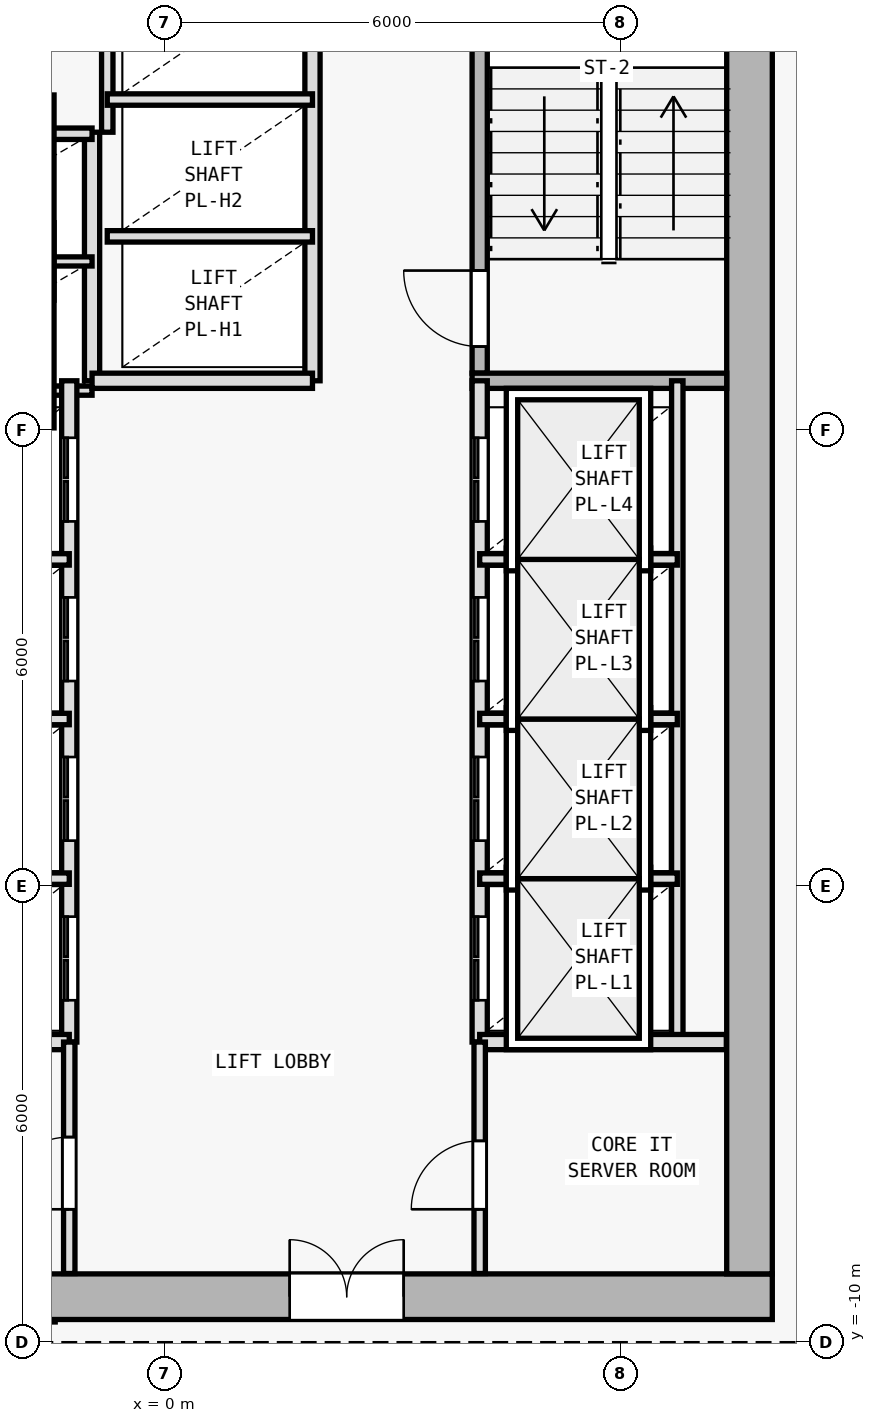
"""IFC4 building model, lengths in metres.
Left out: names, types, materials, properties, quantities, classifications, styles, units other than length and angle.
Written with IfcOpenShell. Run it as: python <this file> out.ifc"""

import sys

from ifc_helpers import new_model, si_unit, direction, frame, frame_2d, origin, origin_2d, place, context, subcontext, project, spatial, rectangle, i_section, extrude, element, fill, save


model = new_model("IFC4")
c1 = context("Model", 3, precision=1e-05, world=origin(), true_north=direction((0.0, 1.0)))
c2 = subcontext(c1, "Body", "Model", "MODEL_VIEW")
j1 = project(units=[si_unit("LENGTHUNIT", "METRE"), si_unit("PLANEANGLEUNIT", "RADIAN")], contexts=[c1])
p1 = place(None, origin())
s1 = spatial("IfcSite", under=j1, at=p1, CompositionType="ELEMENT")
p2 = place(p1, origin())
s2 = spatial("IfcBuilding", under=s1, at=p2, CompositionType="ELEMENT")
p3 = place(p2, frame((0.0, 0.0, 104.1)))
s3 = spatial("IfcBuildingStorey", under=s2, at=p3, CompositionType="ELEMENT", Elevation=104.1)
for number, where, z_axis, x_axis in (
    (1, (7.7, -9.4, 0.0), (0.0, 0.0, 1.0), (1.0, 0.0, 0.0)),
    (2, (0.0, -9.4, 0.0), (0.0, 0.0, 1.0), (1.0, 0.0, 0.0)),
    (3, (7.7, 0.4, 0.0), (0.0, 0.0, 1.0), (1.0, 0.0, 0.0)),
):
    element("IfcColumn", number, at=place(p3, frame(where, z_axis=z_axis, x_axis=x_axis)), inside=s3, PredefinedType="COLUMN", context=c2, shape_type="SweptSolid", body=[
        extrude(i_section(OverallWidth=0.409, OverallDepth=0.425, WebThickness=0.021, FlangeThickness=0.034, FilletRadius=0.015, at=origin_2d()), origin(), (0.0, 0.0, 1.0), 3.6),
    ])
p4 = place(p3, frame((-8.0, -9.4, 0.0), z_axis=(0.0, 0.0, 1.0), x_axis=(1.0, 0.0, 0.0)))
e4 = element("IfcWall", 4, at=p4, inside=s3, PredefinedType="SHEAR", context=c2, shape_type="SweptSolid", body=[
    extrude(rectangle(XDim=16.0, YDim=0.6, at=frame_2d((8.0, 0.0))), origin(), (0.0, 0.0, 1.0), 3.35),
])
p5 = place(p4, frame((9.65, 0.0, 0.0)))
e5 = element("IfcOpeningElement", 5, at=p5, cuts=e4, PredefinedType="OPENING", context=c2, shape_type="SweptSolid", body=[
    extrude(rectangle(XDim=1.5, YDim=2.2, at=frame_2d((0.75, 1.1))), frame((0.0, 0.31, 0.0), z_axis=(0.0, -1.0, 0.0), x_axis=(1.0, 0.0, 0.0)), (0.0, 0.0, 1.0), 0.62),
])
p6 = place(p3, frame((7.7, 9.9, 0.0), z_axis=(0.0, 0.0, 1.0), x_axis=(0.0, -1.0, 0.0)))
e6 = element("IfcWall", 6, at=p6, inside=s3, PredefinedType="SHEAR", context=c2, shape_type="SweptSolid", body=[
    extrude(rectangle(XDim=19.0, YDim=0.6, at=frame_2d((9.5, 0.0))), origin(), (0.0, 0.0, 1.0), 3.35),
])
p7 = place(p3, frame((4.15, 2.75, 0.0), z_axis=(0.0, 0.0, 1.0), x_axis=(0.0, 1.0, 0.0)))
e7 = element("IfcWall", 7, at=p7, inside=s3, PredefinedType="SOLIDWALL", context=c2, shape_type="SweptSolid", body=[
    extrude(rectangle(XDim=7.15, YDim=0.2, at=frame_2d((3.575, 0.0))), origin(), (0.0, 0.0, 1.0), 3.35),
])
p8 = place(p7, frame((0.35, 0.0, 0.0)))
e8 = element("IfcOpeningElement", 8, at=p8, cuts=e7, PredefinedType="OPENING", context=c2, shape_type="SweptSolid", body=[
    extrude(rectangle(XDim=1.0, YDim=2.15, at=frame_2d((0.5, 1.075))), frame((0.0, 0.11, 0.0), z_axis=(0.0, -1.0, 0.0), x_axis=(1.0, 0.0, 0.0)), (0.0, 0.0, 1.0), 0.22),
])
p9 = place(p3, frame((4.05, 2.65, 0.0), z_axis=(0.0, 0.0, 1.0), x_axis=(1.0, 0.0, 0.0)))
e9 = element("IfcWall", 9, at=p9, inside=s3, PredefinedType="SOLIDWALL", context=c2, shape_type="SweptSolid", body=[
    extrude(rectangle(XDim=3.35, YDim=0.2, at=frame_2d((1.675, 0.0))), origin(), (0.0, 0.0, 1.0), 3.35),
])
p10 = place(p3, frame((-0.95, 2.65, 0.0), z_axis=(0.0, 0.0, 1.0), x_axis=(0.0, 1.0, 0.0)))
e10 = element("IfcWall", 10, at=p10, inside=s3, PredefinedType="SOLIDWALL", context=c2, shape_type="SweptSolid", body=[
    extrude(rectangle(XDim=3.27, YDim=0.2, at=frame_2d((1.635, 0.0))), origin(), (0.0, 0.0, 1.0), 3.35),
])
for number, where, z_axis, x_axis in (
    (11, (-3.85, 2.52, 0.0), (0.0, 0.0, 1.0), (1.0, 0.0, 0.0)),
    (12, (-3.85, 4.22, 0.0), (0.0, 0.0, 1.0), (1.0, 0.0, 0.0)),
):
    element("IfcWall", number, at=place(p3, frame(where, z_axis=z_axis, x_axis=x_axis)), inside=s3, PredefinedType="PARTITIONING", context=c2, shape_type="SweptSolid", body=[
        extrude(rectangle(XDim=2.9, YDim=0.12, at=frame_2d((1.45, 0.0))), origin(), (0.0, 0.0, 1.0), 3.35),
    ])
p11 = place(p3, frame((-3.85, 5.9, 0.0), z_axis=(0.0, 0.0, 1.0), x_axis=(1.0, 0.0, 0.0)))
e13 = element("IfcWall", 13, at=p11, inside=s3, PredefinedType="PARTITIONING", context=c2, shape_type="SweptSolid", body=[
    extrude(rectangle(XDim=2.9, YDim=0.15, at=frame_2d((1.45, 0.0))), origin(), (0.0, 0.0, 1.0), 3.35),
])
p12 = place(p3, frame((4.15, -6.05, 0.0), z_axis=(0.0, 0.0, 1.0), x_axis=(0.0, 1.0, 0.0)))
e14 = element("IfcWall", 14, at=p12, inside=s3, PredefinedType="SOLIDWALL", context=c2, shape_type="SweptSolid", body=[
    extrude(rectangle(XDim=8.7, YDim=0.2, at=frame_2d((4.35, 0.0))), origin(), (0.0, 0.0, 1.0), 3.35),
])
p13 = place(p12, frame((0.55, 0.0, 0.0)))
e15 = element("IfcOpeningElement", 15, at=p13, cuts=e14, PredefinedType="OPENING", context=c2, shape_type="SweptSolid", body=[
    extrude(rectangle(XDim=1.1, YDim=2.15, at=frame_2d((0.55, 1.075))), frame((0.0, 0.11, 0.0), z_axis=(0.0, -1.0, 0.0), x_axis=(1.0, 0.0, 0.0)), (0.0, 0.0, 1.0), 0.22),
])
p14 = place(p12, frame((2.65, 0.0, 0.0)))
e16 = element("IfcOpeningElement", 16, at=p14, cuts=e14, PredefinedType="OPENING", context=c2, shape_type="SweptSolid", body=[
    extrude(rectangle(XDim=1.1, YDim=2.15, at=frame_2d((0.55, 1.075))), frame((0.0, 0.11, 0.0), z_axis=(0.0, -1.0, 0.0), x_axis=(1.0, 0.0, 0.0)), (0.0, 0.0, 1.0), 0.22),
])
p15 = place(p12, frame((4.75, 0.0, 0.0)))
e17 = element("IfcOpeningElement", 17, at=p15, cuts=e14, PredefinedType="OPENING", context=c2, shape_type="SweptSolid", body=[
    extrude(rectangle(XDim=1.1, YDim=2.15, at=frame_2d((0.55, 1.075))), frame((0.0, 0.11, 0.0), z_axis=(0.0, -1.0, 0.0), x_axis=(1.0, 0.0, 0.0)), (0.0, 0.0, 1.0), 0.22),
])
p16 = place(p12, frame((6.85, 0.0, 0.0)))
e18 = element("IfcOpeningElement", 18, at=p16, cuts=e14, PredefinedType="OPENING", context=c2, shape_type="SweptSolid", body=[
    extrude(rectangle(XDim=1.1, YDim=2.15, at=frame_2d((0.55, 1.075))), frame((0.0, 0.11, 0.0), z_axis=(0.0, -1.0, 0.0), x_axis=(1.0, 0.0, 0.0)), (0.0, 0.0, 1.0), 0.22),
])
p17 = place(p3, frame((6.75, -6.05, 0.0), z_axis=(0.0, 0.0, 1.0), x_axis=(0.0, 1.0, 0.0)))
e19 = element("IfcWall", 19, at=p17, inside=s3, PredefinedType="PARTITIONING", context=c2, shape_type="SweptSolid", body=[
    extrude(rectangle(XDim=8.7, YDim=0.15, at=frame_2d((4.35, 0.0))), origin(), (0.0, 0.0, 1.0), 3.35),
])
for number, where, z_axis, x_axis in (
    (20, (4.15, -3.9, 0.0), (0.0, 0.0, 1.0), (1.0, 0.0, 0.0)),
    (21, (4.15, -1.8, 0.0), (0.0, 0.0, 1.0), (1.0, 0.0, 0.0)),
    (22, (4.15, 0.3, 0.0), (0.0, 0.0, 1.0), (1.0, 0.0, 0.0)),
):
    element("IfcWall", number, at=place(p3, frame(where, z_axis=z_axis, x_axis=x_axis)), inside=s3, PredefinedType="PARTITIONING", context=c2, shape_type="SweptSolid", body=[
        extrude(rectangle(XDim=2.6, YDim=0.15, at=frame_2d((1.3, 0.0))), origin(), (0.0, 0.0, 1.0), 3.35),
    ])
p18 = place(p3, frame((-1.25, -6.05, 0.0), z_axis=(0.0, 0.0, 1.0), x_axis=(0.0, 1.0, 0.0)))
e23 = element("IfcWall", 23, at=p18, inside=s3, PredefinedType="SOLIDWALL", context=c2, shape_type="SweptSolid", body=[
    extrude(rectangle(XDim=8.7, YDim=0.2, at=frame_2d((4.35, 0.0))), origin(), (0.0, 0.0, 1.0), 3.35),
])
p19 = place(p18, frame((0.55, 0.0, 0.0)))
e24 = element("IfcOpeningElement", 24, at=p19, cuts=e23, PredefinedType="OPENING", context=c2, shape_type="SweptSolid", body=[
    extrude(rectangle(XDim=1.1, YDim=2.15, at=frame_2d((0.55, 1.075))), frame((0.0, 0.11, 0.0), z_axis=(0.0, -1.0, 0.0), x_axis=(1.0, 0.0, 0.0)), (0.0, 0.0, 1.0), 0.22),
])
p20 = place(p18, frame((2.65, 0.0, 0.0)))
e25 = element("IfcOpeningElement", 25, at=p20, cuts=e23, PredefinedType="OPENING", context=c2, shape_type="SweptSolid", body=[
    extrude(rectangle(XDim=1.1, YDim=2.15, at=frame_2d((0.55, 1.075))), frame((0.0, 0.11, 0.0), z_axis=(0.0, -1.0, 0.0), x_axis=(1.0, 0.0, 0.0)), (0.0, 0.0, 1.0), 0.22),
])
p21 = place(p18, frame((4.75, 0.0, 0.0)))
e26 = element("IfcOpeningElement", 26, at=p21, cuts=e23, PredefinedType="OPENING", context=c2, shape_type="SweptSolid", body=[
    extrude(rectangle(XDim=1.1, YDim=2.15, at=frame_2d((0.55, 1.075))), frame((0.0, 0.11, 0.0), z_axis=(0.0, -1.0, 0.0), x_axis=(1.0, 0.0, 0.0)), (0.0, 0.0, 1.0), 0.22),
])
p22 = place(p18, frame((6.85, 0.0, 0.0)))
e27 = element("IfcOpeningElement", 27, at=p22, cuts=e23, PredefinedType="OPENING", context=c2, shape_type="SweptSolid", body=[
    extrude(rectangle(XDim=1.1, YDim=2.15, at=frame_2d((0.55, 1.075))), frame((0.0, 0.11, 0.0), z_axis=(0.0, -1.0, 0.0), x_axis=(1.0, 0.0, 0.0)), (0.0, 0.0, 1.0), 0.22),
])
for number, where, z_axis, x_axis in (
    (28, (-4.15, -3.9, 0.0), (0.0, 0.0, 1.0), (1.0, 0.0, 0.0)),
    (29, (-4.15, -1.8, 0.0), (0.0, 0.0, 1.0), (1.0, 0.0, 0.0)),
    (30, (-4.15, 0.3, 0.0), (0.0, 0.0, 1.0), (1.0, 0.0, 0.0)),
):
    element("IfcWall", number, at=place(p3, frame(where, z_axis=z_axis, x_axis=x_axis)), inside=s3, PredefinedType="PARTITIONING", context=c2, shape_type="SweptSolid", body=[
        extrude(rectangle(XDim=2.9, YDim=0.15, at=frame_2d((1.45, 0.0))), origin(), (0.0, 0.0, 1.0), 3.35),
    ])
p23 = place(p3, frame((1.95, 2.65, 0.0), z_axis=(0.0, 0.0, 1.0), x_axis=(0.0, 1.0, 0.0)))
e31 = element("IfcWall", 31, at=p23, inside=s3, PredefinedType="SOLIDWALL", context=c2, shape_type="SweptSolid", body=[
    extrude(rectangle(XDim=7.245, YDim=0.2, at=frame_2d((3.623, 0.0))), origin(), (0.0, 0.0, 1.0), 3.35),
])
p24 = place(p3, frame((-0.95, 2.65, 0.0), z_axis=(0.0, 0.0, 1.0), x_axis=(1.0, 0.0, 0.0)))
e32 = element("IfcWall", 32, at=p24, inside=s3, PredefinedType="SOLIDWALL", context=c2, shape_type="SweptSolid", body=[
    extrude(rectangle(XDim=2.9, YDim=0.2, at=frame_2d((1.45, 0.0))), origin(), (0.0, 0.0, 1.0), 3.35),
])
p25 = place(p3, frame((-0.75, 5.92, 0.0), z_axis=(0.0, 0.0, 1.0), x_axis=(0.0, 1.0, 0.0)))
e33 = element("IfcWall", 33, at=p25, inside=s3, PredefinedType="PARTITIONING", context=c2, shape_type="SweptSolid", body=[
    extrude(rectangle(XDim=3.975, YDim=0.15, at=frame_2d((1.988, 0.0))), origin(), (0.0, 0.0, 1.0), 3.35),
])
for number, where, z_axis, x_axis in (
    (34, (-0.75, 4.55, 0.0), (0.0, 0.0, 1.0), (1.0, 0.0, 0.0)),
    (35, (-0.75, 6.35, 0.0), (0.0, 0.0, 1.0), (1.0, 0.0, 0.0)),
):
    element("IfcWall", number, at=place(p3, frame(where, z_axis=z_axis, x_axis=x_axis)), inside=s3, PredefinedType="PARTITIONING", context=c2, shape_type="SweptSolid", body=[
        extrude(rectangle(XDim=2.7, YDim=0.15, at=frame_2d((1.35, 0.0))), origin(), (0.0, 0.0, 1.0), 3.35),
    ])
p26 = place(p3, frame((-4.04, -6.05, 0.0), z_axis=(0.0, 0.0, 1.0), x_axis=(1.0, 0.0, 0.0)))
e36 = element("IfcWall", 36, at=p26, inside=s3, PredefinedType="SOLIDWALL", context=c2, shape_type="SweptSolid", body=[
    extrude(rectangle(XDim=2.79, YDim=0.2, at=frame_2d((1.395, 0.0))), origin(), (0.0, 0.0, 1.0), 3.35),
])
p27 = place(p3, frame((4.15, -6.05, 0.0), z_axis=(0.0, 0.0, 1.0), x_axis=(1.0, 0.0, 0.0)))
e37 = element("IfcWall", 37, at=p27, inside=s3, PredefinedType="SOLIDWALL", context=c2, shape_type="SweptSolid", body=[
    extrude(rectangle(XDim=3.245, YDim=0.2, at=frame_2d((1.623, 0.0))), origin(), (0.0, 0.0, 1.0), 3.35),
])
p28 = place(p3, frame((-1.25, -9.095, 0.0), z_axis=(0.0, 0.0, 1.0), x_axis=(0.0, 1.0, 0.0)))
e38 = element("IfcWall", 38, at=p28, inside=s3, PredefinedType="PARTITIONING", context=c2, shape_type="SweptSolid", body=[
    extrude(rectangle(XDim=3.045, YDim=0.15, at=frame_2d((1.522, 0.0))), origin(), (0.0, 0.0, 1.0), 3.35),
])
p29 = place(p28, frame((0.845, 0.0, 0.0)))
e39 = element("IfcOpeningElement", 39, at=p29, cuts=e38, PredefinedType="OPENING", context=c2, shape_type="SweptSolid", body=[
    extrude(rectangle(XDim=0.95, YDim=2.1, at=frame_2d((0.475, 1.05))), frame((0.0, 0.085, 0.0), z_axis=(0.0, -1.0, 0.0), x_axis=(1.0, 0.0, 0.0)), (0.0, 0.0, 1.0), 0.17),
])
p30 = place(p3, frame((4.15, -9.095, 0.0), z_axis=(0.0, 0.0, 1.0), x_axis=(0.0, 1.0, 0.0)))
e40 = element("IfcWall", 40, at=p30, inside=s3, PredefinedType="PARTITIONING", context=c2, shape_type="SweptSolid", body=[
    extrude(rectangle(XDim=3.045, YDim=0.15, at=frame_2d((1.522, 0.0))), origin(), (0.0, 0.0, 1.0), 3.35),
])
p31 = place(p30, frame((0.845, 0.0, 0.0)))
e41 = element("IfcOpeningElement", 41, at=p31, cuts=e40, PredefinedType="OPENING", context=c2, shape_type="SweptSolid", body=[
    extrude(rectangle(XDim=0.9, YDim=2.1, at=frame_2d((0.45, 1.05))), frame((0.0, 0.085, 0.0), z_axis=(0.0, -1.0, 0.0), x_axis=(1.0, 0.0, 0.0)), (0.0, 0.0, 1.0), 0.17),
])
p32 = place(p5, origin())
e42 = element("IfcDoor", 42, at=p32, inside=s3, OperationType="DOUBLE_DOOR_SINGLE_SWING", PredefinedType="DOOR", context=c2, shape_type="SweptSolid", body=[
    extrude(rectangle(XDim=1.5, YDim=2.2, at=frame_2d((0.75, 1.1))), frame((0.0, 0.025, 0.0), z_axis=(0.0, -1.0, 0.0), x_axis=(1.0, 0.0, 0.0)), (0.0, 0.0, 1.0), 0.05),
])
fill(e5, e42)
p33 = place(p8, origin())
e43 = element("IfcDoor", 43, at=p33, inside=s3, OperationType="SINGLE_SWING_RIGHT", PredefinedType="DOOR", context=c2, shape_type="SweptSolid", body=[
    extrude(rectangle(XDim=1.0, YDim=2.15, at=frame_2d((0.5, 1.075))), frame((0.0, 0.025, 0.0), z_axis=(0.0, -1.0, 0.0), x_axis=(1.0, 0.0, 0.0)), (0.0, 0.0, 1.0), 0.05),
])
fill(e8, e43)
p34 = place(p13, origin())
e44 = element("IfcDoor", 44, at=p34, inside=s3, OperationType="DOUBLE_DOOR_SLIDING", PredefinedType="DOOR", context=c2, shape_type="SweptSolid", body=[
    extrude(rectangle(XDim=1.1, YDim=2.15, at=frame_2d((0.55, 1.075))), frame((0.0, 0.025, 0.0), z_axis=(0.0, -1.0, 0.0), x_axis=(1.0, 0.0, 0.0)), (0.0, 0.0, 1.0), 0.05),
])
fill(e15, e44)
p35 = place(p14, origin())
e45 = element("IfcDoor", 45, at=p35, inside=s3, OperationType="DOUBLE_DOOR_SLIDING", PredefinedType="DOOR", context=c2, shape_type="SweptSolid", body=[
    extrude(rectangle(XDim=1.1, YDim=2.15, at=frame_2d((0.55, 1.075))), frame((0.0, 0.025, 0.0), z_axis=(0.0, -1.0, 0.0), x_axis=(1.0, 0.0, 0.0)), (0.0, 0.0, 1.0), 0.05),
])
fill(e16, e45)
p36 = place(p15, origin())
e46 = element("IfcDoor", 46, at=p36, inside=s3, OperationType="DOUBLE_DOOR_SLIDING", PredefinedType="DOOR", context=c2, shape_type="SweptSolid", body=[
    extrude(rectangle(XDim=1.1, YDim=2.15, at=frame_2d((0.55, 1.075))), frame((0.0, 0.025, 0.0), z_axis=(0.0, -1.0, 0.0), x_axis=(1.0, 0.0, 0.0)), (0.0, 0.0, 1.0), 0.05),
])
fill(e17, e46)
p37 = place(p16, origin())
e47 = element("IfcDoor", 47, at=p37, inside=s3, OperationType="DOUBLE_DOOR_SLIDING", PredefinedType="DOOR", context=c2, shape_type="SweptSolid", body=[
    extrude(rectangle(XDim=1.1, YDim=2.15, at=frame_2d((0.55, 1.075))), frame((0.0, 0.025, 0.0), z_axis=(0.0, -1.0, 0.0), x_axis=(1.0, 0.0, 0.0)), (0.0, 0.0, 1.0), 0.05),
])
fill(e18, e47)
p38 = place(p19, origin())
e48 = element("IfcDoor", 48, at=p38, inside=s3, OperationType="DOUBLE_DOOR_SLIDING", PredefinedType="DOOR", context=c2, shape_type="SweptSolid", body=[
    extrude(rectangle(XDim=1.1, YDim=2.15, at=frame_2d((0.55, 1.075))), frame((0.0, 0.025, 0.0), z_axis=(0.0, -1.0, 0.0), x_axis=(1.0, 0.0, 0.0)), (0.0, 0.0, 1.0), 0.05),
])
fill(e24, e48)
p39 = place(p20, origin())
e49 = element("IfcDoor", 49, at=p39, inside=s3, OperationType="DOUBLE_DOOR_SLIDING", PredefinedType="DOOR", context=c2, shape_type="SweptSolid", body=[
    extrude(rectangle(XDim=1.1, YDim=2.15, at=frame_2d((0.55, 1.075))), frame((0.0, 0.025, 0.0), z_axis=(0.0, -1.0, 0.0), x_axis=(1.0, 0.0, 0.0)), (0.0, 0.0, 1.0), 0.05),
])
fill(e25, e49)
p40 = place(p21, origin())
e50 = element("IfcDoor", 50, at=p40, inside=s3, OperationType="DOUBLE_DOOR_SLIDING", PredefinedType="DOOR", context=c2, shape_type="SweptSolid", body=[
    extrude(rectangle(XDim=1.1, YDim=2.15, at=frame_2d((0.55, 1.075))), frame((0.0, 0.025, 0.0), z_axis=(0.0, -1.0, 0.0), x_axis=(1.0, 0.0, 0.0)), (0.0, 0.0, 1.0), 0.05),
])
fill(e26, e50)
p41 = place(p22, origin())
e51 = element("IfcDoor", 51, at=p41, inside=s3, OperationType="DOUBLE_DOOR_SLIDING", PredefinedType="DOOR", context=c2, shape_type="SweptSolid", body=[
    extrude(rectangle(XDim=1.1, YDim=2.15, at=frame_2d((0.55, 1.075))), frame((0.0, 0.025, 0.0), z_axis=(0.0, -1.0, 0.0), x_axis=(1.0, 0.0, 0.0)), (0.0, 0.0, 1.0), 0.05),
])
fill(e27, e51)
p42 = place(p29, origin())
e52 = element("IfcDoor", 52, at=p42, inside=s3, OperationType="SINGLE_SWING_LEFT", PredefinedType="DOOR", context=c2, shape_type="SweptSolid", body=[
    extrude(rectangle(XDim=0.95, YDim=2.1, at=frame_2d((0.475, 1.05))), frame((0.0, 0.025, 0.0), z_axis=(0.0, -1.0, 0.0), x_axis=(1.0, 0.0, 0.0)), (0.0, 0.0, 1.0), 0.05),
])
fill(e39, e52)
p43 = place(p31, origin())
e53 = element("IfcDoor", 53, at=p43, inside=s3, OperationType="SINGLE_SWING_LEFT", PredefinedType="DOOR", context=c2, shape_type="SweptSolid", body=[
    extrude(rectangle(XDim=0.9, YDim=2.1, at=frame_2d((0.45, 1.05))), frame((0.0, 0.025, 0.0), z_axis=(0.0, -1.0, 0.0), x_axis=(1.0, 0.0, 0.0)), (0.0, 0.0, 1.0), 0.05),
])
fill(e41, e53)
save(model, sys.argv[1])
